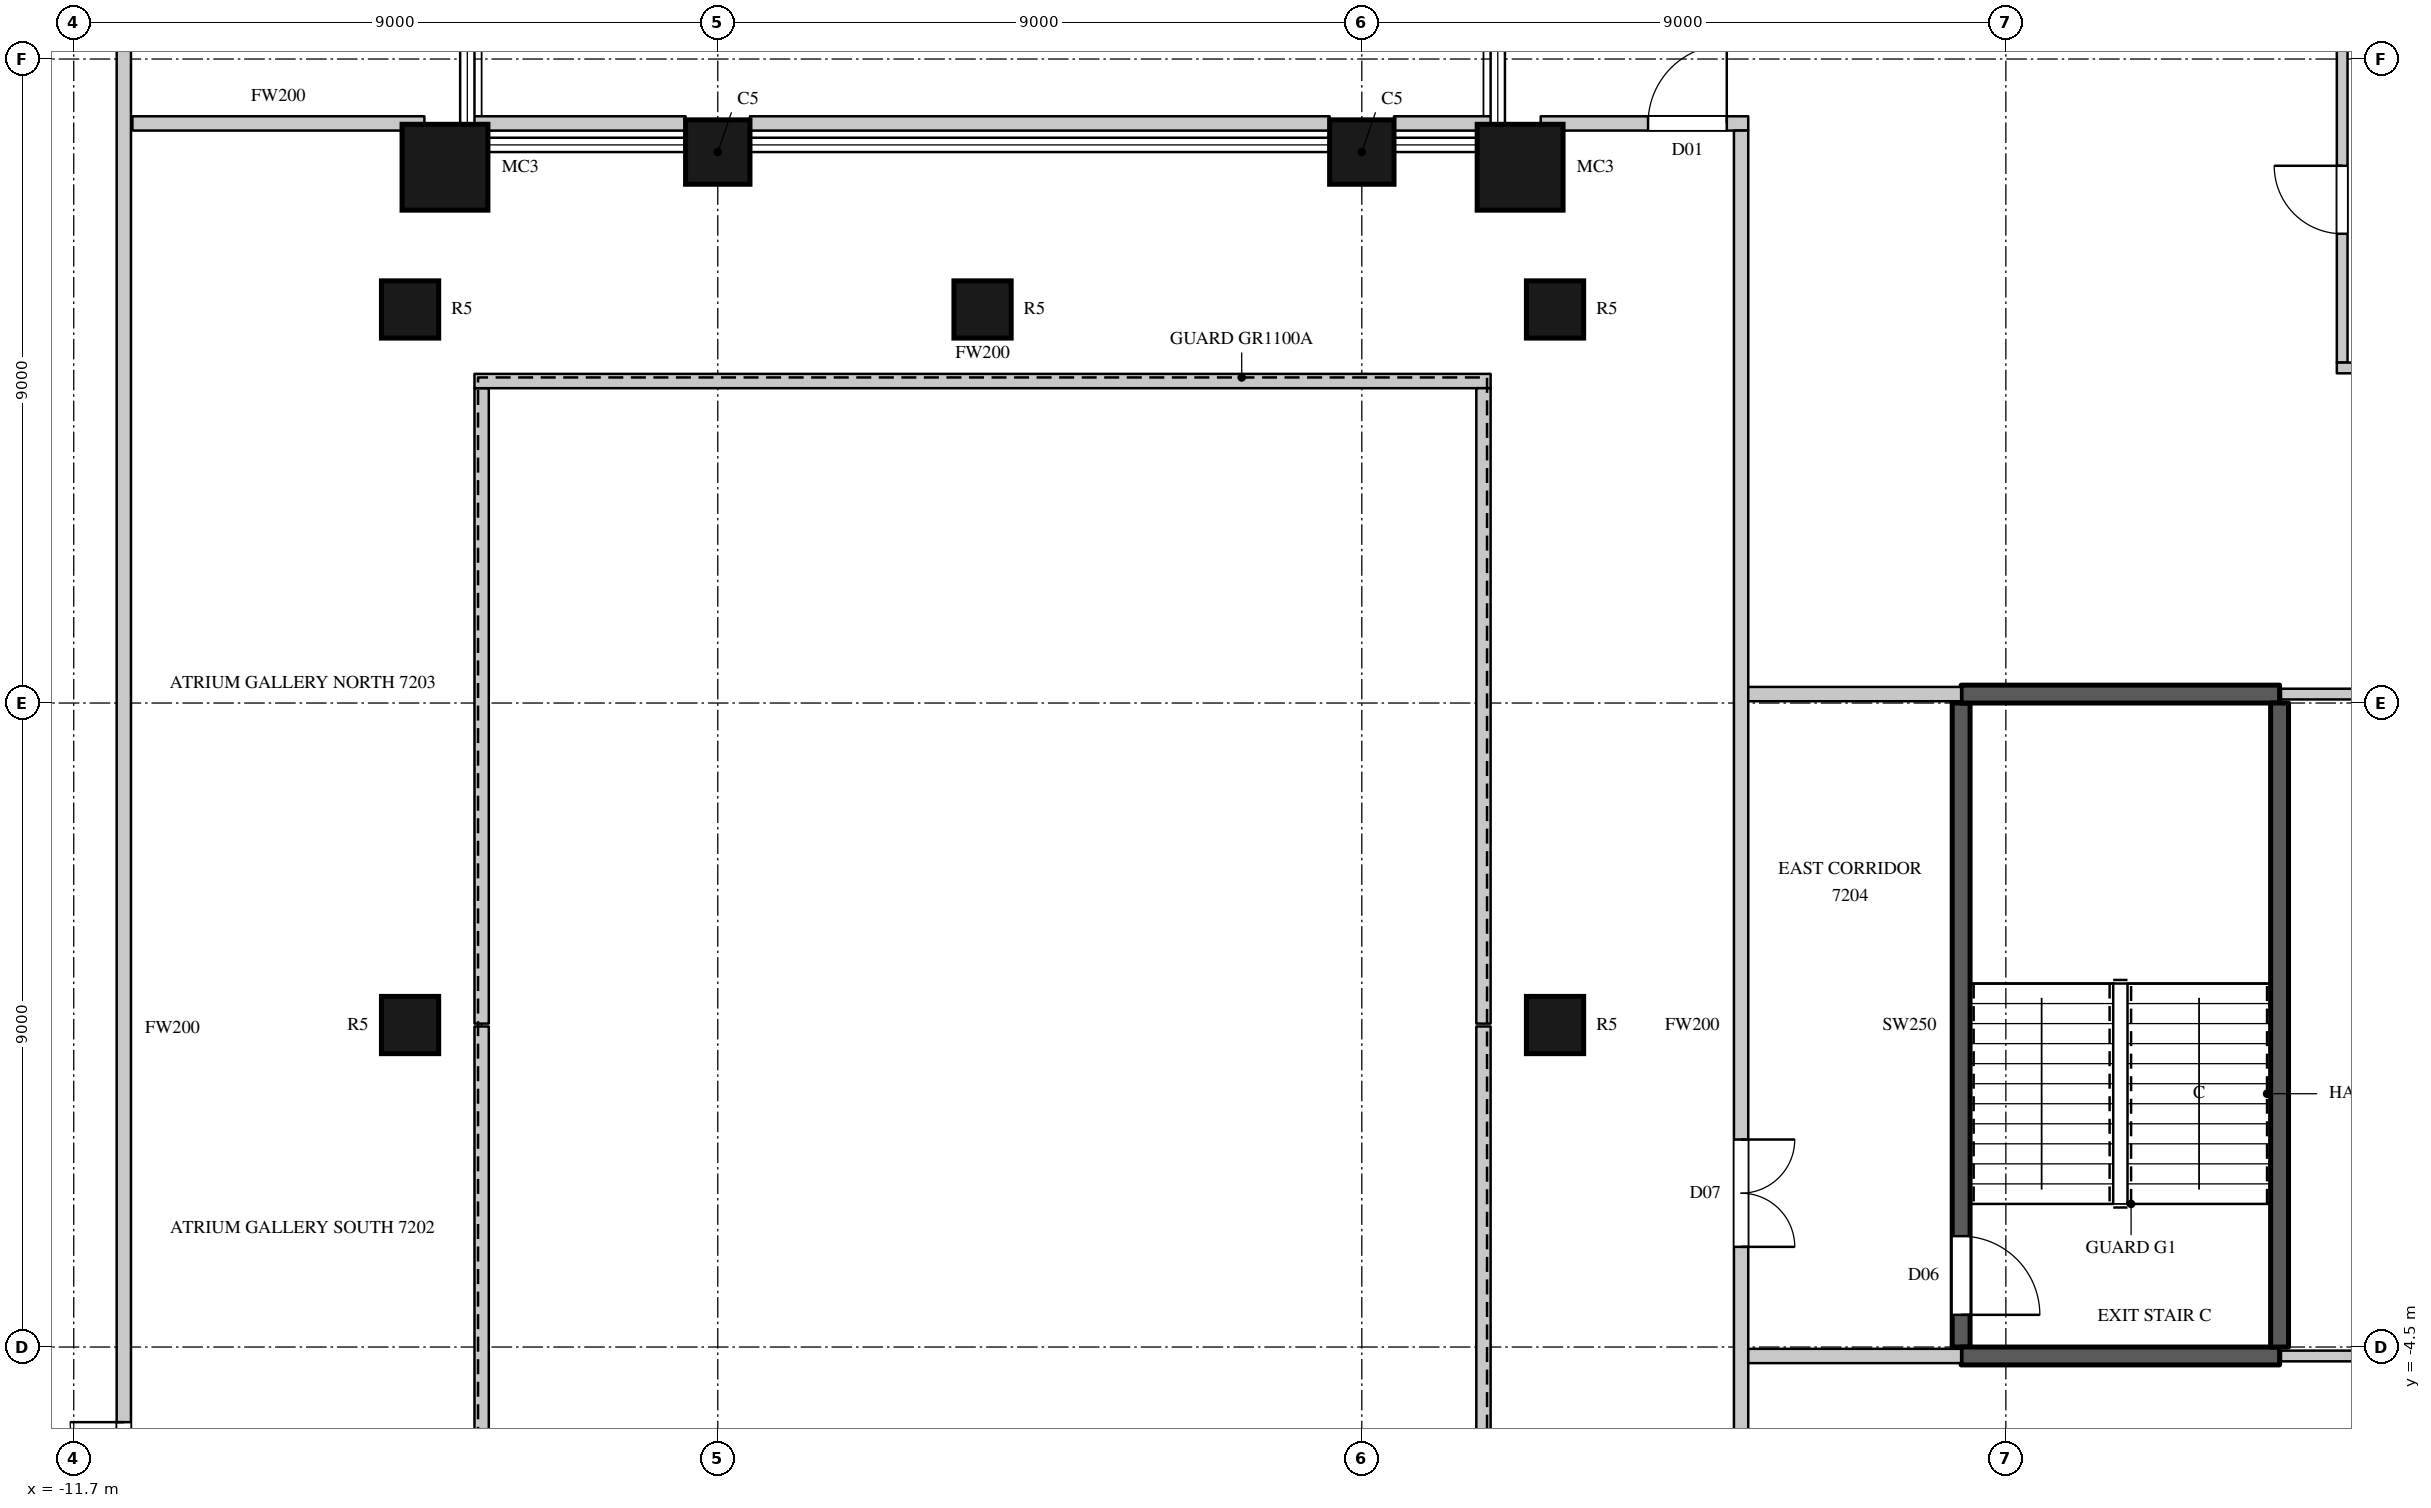
"""IFC4 building model, lengths in metres.
Left out: names, types, materials, properties, quantities, classifications, styles, units other than length and angle.
Written with IfcOpenShell. Run it as: python <this file> out.ifc"""

import sys

from ifc_helpers import new_model, si_unit, direction, frame, frame_2d, origin, origin_2d, place, context, subcontext, project, spatial, rectangle, circle, extrude, element, fill, save


model = new_model("IFC4")
c1 = context("Model", 3, precision=1e-05, world=origin(), true_north=direction((0.0, 1.0)))
c2 = subcontext(c1, "Body", "Model", "MODEL_VIEW")
j1 = project(units=[si_unit("LENGTHUNIT", "METRE"), si_unit("PLANEANGLEUNIT", "RADIAN")], contexts=[c1])
p1 = place(None, origin())
s1 = spatial("IfcSite", under=j1, at=p1, CompositionType="ELEMENT")
p2 = place(p1, origin())
s2 = spatial("IfcBuilding", under=s1, at=p2, CompositionType="ELEMENT")
p3 = place(p2, frame((0.0, 0.0, 317.2)))
s3 = spatial("IfcBuildingStorey", under=s2, at=p3, CompositionType="ELEMENT", Elevation=317.2)
p4 = place(p3, frame((8.512, 11.988, 0.0), z_axis=(0.0, 0.0, 1.0), x_axis=(1.0, 0.0, 0.0)))
e1 = element("IfcColumn", 1, at=p4, inside=s3, PredefinedType="COLUMN", context=c2, shape_type="SweptSolid", body=[
    extrude(circle(Radius=0.6, at=origin_2d()), origin(), (0.0, 0.0, 1.0), 4.1),
])
for number, where, z_axis, x_axis in (
    (2, (6.3, 12.2, 0.0), (0.0, 0.0, 1.0), (-1.0, 0.0, 0.0)),
    (3, (-2.7, 12.2, 0.0), (0.0, 0.0, 1.0), (-1.0, 0.0, 0.0)),
):
    element("IfcColumn", number, at=place(p3, frame(where, z_axis=z_axis, x_axis=x_axis)), inside=s3, PredefinedType="COLUMN", context=c2, shape_type="SweptSolid", body=[
        extrude(rectangle(XDim=0.9, YDim=0.9, at=origin_2d()), origin(), (0.0, 0.0, 1.0), 4.1),
    ])
p5 = place(p3, frame((-6.512, 11.988, 0.0), z_axis=(0.0, 0.0, 1.0), x_axis=(1.0, 0.0, 0.0)))
e4 = element("IfcColumn", 4, at=p5, inside=s3, PredefinedType="COLUMN", context=c2, shape_type="SweptSolid", body=[
    extrude(circle(Radius=0.6, at=origin_2d()), origin(), (0.0, 0.0, 1.0), 4.1),
])
for number, where, z_axis, x_axis in (
    (5, (-7.0, 0.0, 0.0), (0.0, 0.0, 1.0), (1.0, 0.0, 0.0)),
    (6, (-7.0, 10.0, 0.0), (0.0, 0.0, 1.0), (1.0, 0.0, 0.0)),
    (7, (1.0, 10.0, 0.0), (0.0, 0.0, 1.0), (1.0, 0.0, 0.0)),
    (8, (9.0, 0.0, 0.0), (0.0, 0.0, 1.0), (1.0, 0.0, 0.0)),
    (9, (9.0, 10.0, 0.0), (0.0, 0.0, 1.0), (1.0, 0.0, 0.0)),
):
    element("IfcColumn", number, at=place(p3, frame(where, z_axis=z_axis, x_axis=x_axis)), inside=s3, PredefinedType="COLUMN", context=c2, shape_type="SweptSolid", body=[
        extrude(circle(Radius=0.4, at=origin_2d()), origin(), (0.0, 0.0, 1.0), 4.1),
    ])
p6 = place(p3, frame((-11.0, -14.8, 0.0), z_axis=(0.0, 0.0, 1.0), x_axis=(0.0, 1.0, 0.0)))
e10 = element("IfcWall", 10, at=p6, inside=s3, PredefinedType="PARTITIONING", context=c2, shape_type="SweptSolid", body=[
    extrude(rectangle(XDim=29.5, YDim=0.2, at=frame_2d((14.75, 0.0))), origin(), (0.0, 0.0, 1.0), 3.8),
])
p7 = place(p6, frame((7.75, 0.0, 0.0)))
e11 = element("IfcOpeningElement", 11, at=p7, cuts=e10, PredefinedType="OPENING", context=c2, shape_type="SweptSolid", body=[
    extrude(rectangle(XDim=1.5, YDim=2.4, at=frame_2d((0.75, 1.2))), frame((0.0, 0.11, 0.0), z_axis=(0.0, -1.0, 0.0), x_axis=(1.0, 0.0, 0.0)), (0.0, 0.0, 1.0), 0.22),
])
p8 = place(p3, frame((-10.88, 12.6, 0.0), z_axis=(0.0, 0.0, 1.0), x_axis=(1.0, 0.0, 0.0)))
e12 = element("IfcWall", 12, at=p8, inside=s3, PredefinedType="PARTITIONING", context=c2, shape_type="SweptSolid", body=[
    extrude(rectangle(XDim=4.08, YDim=0.2, at=frame_2d((2.04, 0.0))), origin(), (0.0, 0.0, 1.0), 3.8),
])
p9 = place(p3, frame((-6.23, 12.6, 0.0), z_axis=(0.0, 0.0, 1.0), x_axis=(1.0, 0.0, 0.0)))
e13 = element("IfcWall", 13, at=p9, inside=s3, PredefinedType="PARTITIONING", context=c2, shape_type="SweptSolid", body=[
    extrude(rectangle(XDim=3.08, YDim=0.2, at=frame_2d((1.54, 0.0))), origin(), (0.0, 0.0, 1.0), 3.8),
])
p10 = place(p3, frame((-2.25, 12.6, 0.0), z_axis=(0.0, 0.0, 1.0), x_axis=(1.0, 0.0, 0.0)))
e14 = element("IfcWall", 14, at=p10, inside=s3, PredefinedType="PARTITIONING", context=c2, shape_type="SweptSolid", body=[
    extrude(rectangle(XDim=8.1, YDim=0.2, at=frame_2d((4.05, 0.0))), origin(), (0.0, 0.0, 1.0), 3.8),
])
p11 = place(p3, frame((6.75, 12.6, 0.0), z_axis=(0.0, 0.0, 1.0), x_axis=(1.0, 0.0, 0.0)))
e15 = element("IfcWall", 15, at=p11, inside=s3, PredefinedType="PARTITIONING", context=c2, shape_type="SweptSolid", body=[
    extrude(rectangle(XDim=1.48, YDim=0.2, at=frame_2d((0.74, 0.0))), origin(), (0.0, 0.0, 1.0), 3.8),
])
for number, where, z_axis, x_axis in (
    (16, (-6.0, -8.9, 0.0), (0.0, 0.0, 1.0), (0.0, 1.0, 0.0)),
    (17, (-6.0, 0.02, 0.0), (0.0, 0.0, 1.0), (0.0, 1.0, 0.0)),
):
    element("IfcWall", number, at=place(p3, frame(where, z_axis=z_axis, x_axis=x_axis)), inside=s3, PredefinedType="PARTITIONING", context=c2, shape_type="SweptSolid", body=[
        extrude(rectangle(XDim=8.88, YDim=0.2, at=frame_2d((4.44, 0.0))), origin(), (0.0, 0.0, 1.0), 3.8),
    ])
p12 = place(p3, frame((-6.1, 9.0, 0.0), z_axis=(0.0, 0.0, 1.0), x_axis=(1.0, 0.0, 0.0)))
e18 = element("IfcWall", 18, at=p12, inside=s3, PredefinedType="PARTITIONING", context=c2, shape_type="SweptSolid", body=[
    extrude(rectangle(XDim=14.2, YDim=0.2, at=frame_2d((7.1, 0.0))), origin(), (0.0, 0.0, 1.0), 3.8),
])
for number, where, z_axis, x_axis in (
    (19, (8.0, -8.9, 0.0), (0.0, 0.0, 1.0), (0.0, 1.0, 0.0)),
    (20, (8.0, 0.02, 0.0), (0.0, 0.0, 1.0), (0.0, 1.0, 0.0)),
):
    element("IfcWall", number, at=place(p3, frame(where, z_axis=z_axis, x_axis=x_axis)), inside=s3, PredefinedType="PARTITIONING", context=c2, shape_type="SweptSolid", body=[
        extrude(rectangle(XDim=8.88, YDim=0.2, at=frame_2d((4.44, 0.0))), origin(), (0.0, 0.0, 1.0), 3.8),
    ])
p13 = place(p3, frame((8.8, 12.6, 0.0), z_axis=(0.0, 0.0, 1.0), x_axis=(1.0, 0.0, 0.0)))
e21 = element("IfcWall", 21, at=p13, inside=s3, PredefinedType="PARTITIONING", context=c2, shape_type="SweptSolid", body=[
    extrude(rectangle(XDim=2.9, YDim=0.2, at=frame_2d((1.45, 0.0))), origin(), (0.0, 0.0, 1.0), 3.8),
])
p14 = place(p13, frame((1.5, 0.0, 0.0)))
e22 = element("IfcOpeningElement", 22, at=p14, cuts=e21, PredefinedType="OPENING", context=c2, shape_type="SweptSolid", body=[
    extrude(rectangle(XDim=1.1, YDim=2.4, at=frame_2d((0.55, 1.2))), frame((0.0, 0.11, 0.0), z_axis=(0.0, -1.0, 0.0), x_axis=(1.0, 0.0, 0.0)), (0.0, 0.0, 1.0), 0.22),
])
p15 = place(p3, frame((11.6, -12.5, 0.0), z_axis=(0.0, 0.0, 1.0), x_axis=(0.0, 1.0, 0.0)))
e23 = element("IfcWall", 23, at=p15, inside=s3, PredefinedType="PARTITIONING", context=c2, shape_type="SweptSolid", body=[
    extrude(rectangle(XDim=25.0, YDim=0.2, at=frame_2d((12.5, 0.0))), origin(), (0.0, 0.0, 1.0), 3.8),
])
p16 = place(p15, frame((9.4, 0.0, 0.0)))
e24 = element("IfcOpeningElement", 24, at=p16, cuts=e23, PredefinedType="OPENING", context=c2, shape_type="SweptSolid", body=[
    extrude(rectangle(XDim=1.5, YDim=2.4, at=frame_2d((0.75, 1.2))), frame((0.0, 0.11, 0.0), z_axis=(0.0, -1.0, 0.0), x_axis=(1.0, 0.0, 0.0)), (0.0, 0.0, 1.0), 0.22),
])
p17 = place(p15, frame((5.5, 0.0, 0.0)))
e25 = element("IfcOpeningElement", 25, at=p17, cuts=e23, PredefinedType="OPENING", context=c2, shape_type="SweptSolid", body=[
    extrude(rectangle(XDim=1.1, YDim=2.4, at=frame_2d((0.55, 1.2))), frame((0.0, 0.11, 0.0), z_axis=(0.0, -1.0, 0.0), x_axis=(1.0, 0.0, 0.0)), (0.0, 0.0, 1.0), 0.22),
])
for number, where, z_axis, x_axis in (
    (26, (11.7, -4.625, 0.0), (0.0, 0.0, 1.0), (1.0, 0.0, 0.0)),
    (27, (11.7, 4.625, 0.0), (0.0, 0.0, 1.0), (1.0, 0.0, 0.0)),
):
    element("IfcWall", number, at=place(p3, frame(where, z_axis=z_axis, x_axis=x_axis)), inside=s3, PredefinedType="PARTITIONING", context=c2, shape_type="SweptSolid", body=[
        extrude(rectangle(XDim=2.975, YDim=0.2, at=frame_2d((1.488, 0.0))), origin(), (0.0, 0.0, 1.0), 3.8),
    ])
for number, where, z_axis, x_axis in (
    (28, (19.145, -4.625, 0.0), (0.0, 0.0, 1.0), (1.0, 0.0, 0.0)),
    (29, (19.145, 4.625, 0.0), (0.0, 0.0, 1.0), (1.0, 0.0, 0.0)),
):
    element("IfcWall", number, at=place(p3, frame(where, z_axis=z_axis, x_axis=x_axis)), inside=s3, PredefinedType="PARTITIONING", context=c2, shape_type="SweptSolid", body=[
        extrude(rectangle(XDim=4.705, YDim=0.15, at=frame_2d((2.353, 0.0))), origin(), (0.0, 0.0, 1.0), 3.8),
    ])
p18 = place(p3, frame((20.0, 9.258, 0.0), z_axis=(0.0, 0.0, 1.0), x_axis=(0.0, 1.0, 0.0)))
e30 = element("IfcWall", 30, at=p18, inside=s3, PredefinedType="PARTITIONING", context=c2, shape_type="SweptSolid", body=[
    extrude(rectangle(XDim=4.532, YDim=0.15, at=frame_2d((2.266, 0.0))), origin(), (0.0, 0.0, 1.0), 3.8),
])
p19 = place(p18, frame((1.8, 0.0, 0.0)))
e31 = element("IfcOpeningElement", 31, at=p19, cuts=e30, PredefinedType="OPENING", context=c2, shape_type="SweptSolid", body=[
    extrude(rectangle(XDim=0.95, YDim=2.2, at=frame_2d((0.475, 1.1))), frame((0.0, 0.085, 0.0), z_axis=(0.0, -1.0, 0.0), x_axis=(1.0, 0.0, 0.0)), (0.0, 0.0, 1.0), 0.17),
])
p20 = place(p3, frame((19.925, 9.183, 0.0), z_axis=(0.0, 0.0, 1.0), x_axis=(1.0, 0.0, 0.0)))
e32 = element("IfcWall", 32, at=p20, inside=s3, PredefinedType="PARTITIONING", context=c2, shape_type="SweptSolid", body=[
    extrude(rectangle(XDim=4.375, YDim=0.15, at=frame_2d((2.188, 0.0))), origin(), (0.0, 0.0, 1.0), 3.15),
])
p21 = place(p3, frame((14.675, -4.5, 0.0), z_axis=(0.0, 0.0, 1.0), x_axis=(0.0, 1.0, 0.0)))
e33 = element("IfcWall", 33, at=p21, inside=s3, PredefinedType="SHEAR", context=c2, shape_type="SweptSolid", body=[
    extrude(rectangle(XDim=9.0, YDim=0.25, at=frame_2d((4.5, 0.0))), origin(), (0.0, 0.0, 1.0), 3.8),
])
p22 = place(p21, frame((0.45, 0.0, 0.0)))
e34 = element("IfcOpeningElement", 34, at=p22, cuts=e33, PredefinedType="OPENING", context=c2, shape_type="SweptSolid", body=[
    extrude(rectangle(XDim=1.1, YDim=2.2, at=frame_2d((0.55, 1.1))), frame((0.0, 0.135, 0.0), z_axis=(0.0, -1.0, 0.0), x_axis=(1.0, 0.0, 0.0)), (0.0, 0.0, 1.0), 0.27),
])
for number, where, z_axis, x_axis in (
    (35, (14.675, -4.625, 0.0), (0.0, 0.0, 1.0), (1.0, 0.0, 0.0)),
    (36, (14.675, 4.625, 0.0), (0.0, 0.0, 1.0), (1.0, 0.0, 0.0)),
):
    element("IfcWall", number, at=place(p3, frame(where, z_axis=z_axis, x_axis=x_axis)), inside=s3, PredefinedType="SHEAR", context=c2, shape_type="SweptSolid", body=[
        extrude(rectangle(XDim=4.45, YDim=0.25, at=frame_2d((2.225, 0.0))), origin(), (0.0, 0.0, 1.0), 3.8),
    ])
p23 = place(p3, frame((19.125, -4.5, 0.0), z_axis=(0.0, 0.0, 1.0), x_axis=(0.0, 1.0, 0.0)))
e37 = element("IfcWall", 37, at=p23, inside=s3, PredefinedType="SHEAR", context=c2, shape_type="SweptSolid", body=[
    extrude(rectangle(XDim=9.0, YDim=0.25, at=frame_2d((4.5, 0.0))), origin(), (0.0, 0.0, 1.0), 3.8),
])
p24 = place(p7, origin())
e38 = element("IfcDoor", 38, at=p24, inside=s3, OperationType="DOUBLE_DOOR_SINGLE_SWING", PredefinedType="DOOR", context=c2, shape_type="SweptSolid", body=[
    extrude(rectangle(XDim=1.5, YDim=2.4, at=frame_2d((0.75, 1.2))), frame((0.0, 0.025, 0.0), z_axis=(0.0, -1.0, 0.0), x_axis=(1.0, 0.0, 0.0)), (0.0, 0.0, 1.0), 0.05),
])
fill(e11, e38)
p25 = place(p16, origin())
e39 = element("IfcDoor", 39, at=p25, inside=s3, OperationType="DOUBLE_DOOR_SINGLE_SWING", PredefinedType="DOOR", context=c2, shape_type="SweptSolid", body=[
    extrude(rectangle(XDim=1.5, YDim=2.4, at=frame_2d((0.75, 1.2))), frame((0.0, 0.025, 0.0), z_axis=(0.0, -1.0, 0.0), x_axis=(1.0, 0.0, 0.0)), (0.0, 0.0, 1.0), 0.05),
])
fill(e24, e39)
p26 = place(p14, origin())
e40 = element("IfcDoor", 40, at=p26, inside=s3, OperationType="SINGLE_SWING_RIGHT", PredefinedType="DOOR", context=c2, shape_type="SweptSolid", body=[
    extrude(rectangle(XDim=1.1, YDim=2.4, at=frame_2d((0.55, 1.2))), frame((0.0, 0.025, 0.0), z_axis=(0.0, -1.0, 0.0), x_axis=(1.0, 0.0, 0.0)), (0.0, 0.0, 1.0), 0.05),
])
fill(e22, e40)
p27 = place(p19, origin())
e41 = element("IfcDoor", 41, at=p27, inside=s3, OperationType="SINGLE_SWING_RIGHT", PredefinedType="DOOR", context=c2, shape_type="SweptSolid", body=[
    extrude(rectangle(XDim=0.95, YDim=2.2, at=frame_2d((0.475, 1.1))), frame((0.0, 0.025, 0.0), z_axis=(0.0, -1.0, 0.0), x_axis=(1.0, 0.0, 0.0)), (0.0, 0.0, 1.0), 0.05),
])
fill(e31, e41)
p28 = place(p22, origin())
e42 = element("IfcDoor", 42, at=p28, inside=s3, OperationType="SINGLE_SWING_RIGHT", PredefinedType="DOOR", context=c2, shape_type="SweptSolid", body=[
    extrude(rectangle(XDim=1.1, YDim=2.2, at=frame_2d((0.55, 1.1))), frame((0.0, 0.025, 0.0), z_axis=(0.0, -1.0, 0.0), x_axis=(1.0, 0.0, 0.0)), (0.0, 0.0, 1.0), 0.05),
])
fill(e34, e42)
save(model, sys.argv[1])
